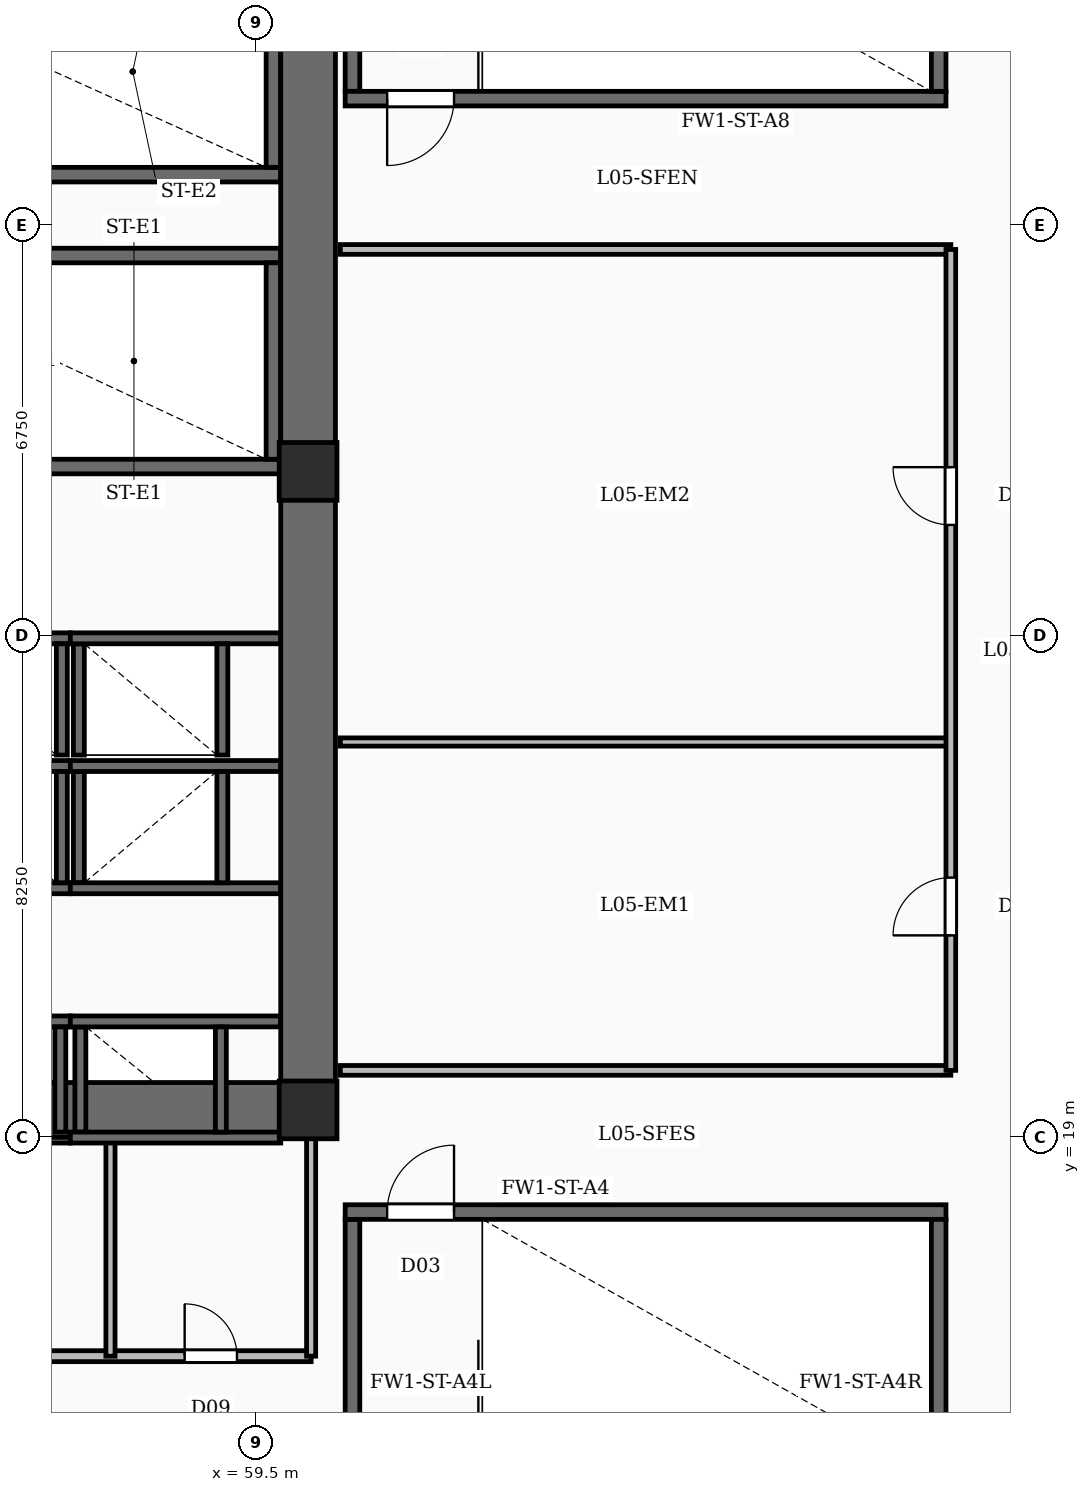
"""IFC4 building model, lengths in metres.
Left out: names, types, materials, properties, quantities, classifications, styles, units other than length and angle.
Written with IfcOpenShell. Run it as: python <this file> out.ifc"""

import sys

from ifc_helpers import new_model, si_unit, direction, frame, frame_2d, origin, origin_2d, place, context, subcontext, project, spatial, rectangle, extrude, element, fill, save


model = new_model("IFC4")
c1 = context("Model", 3, precision=1e-05, world=origin(), true_north=direction((0.0, 1.0)))
c2 = subcontext(c1, "Body", "Model", "MODEL_VIEW")
j1 = project(units=[si_unit("LENGTHUNIT", "METRE"), si_unit("PLANEANGLEUNIT", "RADIAN")], contexts=[c1])
p1 = place(None, origin())
s1 = spatial("IfcSite", under=j1, at=p1, CompositionType="ELEMENT")
p2 = place(p1, origin())
s2 = spatial("IfcBuilding", under=s1, at=p2, CompositionType="ELEMENT")
p3 = place(p2, frame((0.0, 0.0, 28.0)))
s3 = spatial("IfcBuildingStorey", under=s2, at=p3, CompositionType="ELEMENT", Elevation=28.0)
p4 = place(p3, frame((60.35, 19.0, -0.35), z_axis=(0.0, 0.0, 1.0), x_axis=(0.0, 1.0, 0.0)))
e1 = element("IfcWall", 1, at=p4, inside=s3, PredefinedType="SHEAR", context=c2, shape_type="SweptSolid", body=[
    extrude(rectangle(XDim=20.8, YDim=0.9, at=frame_2d((10.4, 0.0))), origin(), (0.0, 0.0, 1.0), 5.9),
])
p5 = place(p3, frame((51.0, 19.45, -0.35), z_axis=(0.0, 0.0, 1.0), x_axis=(1.0, 0.0, 0.0)))
e2 = element("IfcWall", 2, at=p5, inside=s3, PredefinedType="SHEAR", context=c2, shape_type="SweptSolid", body=[
    extrude(rectangle(XDim=8.9, YDim=0.9, at=frame_2d((4.45, 0.0))), origin(), (0.0, 0.0, 1.0), 5.9),
])
for number, where, z_axis, x_axis in (
    (3, (60.35, 19.45, -0.35), (0.0, 0.0, 1.0), (1.0, 0.0, 0.0)),
    (4, (60.35, 29.95, -0.35), (0.0, 0.0, 1.0), (1.0, 0.0, 0.0)),
):
    element("IfcColumn", number, at=place(p3, frame(where, z_axis=z_axis, x_axis=x_axis)), inside=s3, PredefinedType="COLUMN", context=c2, shape_type="SweptSolid", body=[
        extrude(rectangle(XDim=0.95, YDim=0.95, at=origin_2d()), origin(), (0.0, 0.0, 1.0), 5.9),
    ])
p6 = place(p3, frame((60.96, 17.77, 0.0), z_axis=(0.0, 0.0, 1.0), x_axis=(1.0, 0.0, 0.0)))
e5 = element("IfcWall", 5, at=p6, inside=s3, PredefinedType="SOLIDWALL", context=c2, shape_type="SweptSolid", body=[
    extrude(rectangle(XDim=9.88, YDim=0.24, at=frame_2d((4.94, 0.0))), origin(), (0.0, 0.0, 1.0), 5.55),
])
p7 = place(p6, frame((0.69, 0.0, 0.0)))
e6 = element("IfcOpeningElement", 6, at=p7, cuts=e5, PredefinedType="OPENING", context=c2, shape_type="SweptSolid", body=[
    extrude(rectangle(XDim=1.1, YDim=2.15, at=frame_2d((0.55, 1.075))), frame((0.0, 0.13, 0.0), z_axis=(0.0, -1.0, 0.0), x_axis=(1.0, 0.0, 0.0)), (0.0, 0.0, 1.0), 0.26),
])
for number, where, z_axis, x_axis in (
    (7, (61.08, 13.5, 0.0), (0.0, 0.0, 1.0), (0.0, 1.0, 0.0)),
    (8, (70.72, 13.5, 0.0), (0.0, 0.0, 1.0), (0.0, 1.0, 0.0)),
):
    element("IfcWall", number, at=place(p3, frame(where, z_axis=z_axis, x_axis=x_axis)), inside=s3, PredefinedType="SOLIDWALL", context=c2, shape_type="SweptSolid", body=[
        extrude(rectangle(XDim=4.15, YDim=0.24, at=frame_2d((2.075, 0.0))), origin(), (0.0, 0.0, 1.0), 5.55),
    ])
p8 = place(p3, frame((70.84, 36.08, 0.0), z_axis=(0.0, 0.0, 1.0), x_axis=(-1.0, 0.0, 0.0)))
e9 = element("IfcWall", 9, at=p8, inside=s3, PredefinedType="SOLIDWALL", context=c2, shape_type="SweptSolid", body=[
    extrude(rectangle(XDim=9.88, YDim=0.24, at=frame_2d((4.94, 0.0))), origin(), (0.0, 0.0, 1.0), 5.55),
])
p9 = place(p8, frame((8.09, 0.0, 0.0)))
e10 = element("IfcOpeningElement", 10, at=p9, cuts=e9, PredefinedType="OPENING", context=c2, shape_type="SweptSolid", body=[
    extrude(rectangle(XDim=1.1, YDim=2.15, at=frame_2d((0.55, 1.075))), frame((0.0, 0.13, 0.0), z_axis=(0.0, -1.0, 0.0), x_axis=(1.0, 0.0, 0.0)), (0.0, 0.0, 1.0), 0.26),
])
for number, where, z_axis, x_axis in (
    (11, (61.08, 36.2, 0.0), (0.0, 0.0, 1.0), (0.0, 1.0, 0.0)),
    (12, (70.72, 36.2, 0.0), (0.0, 0.0, 1.0), (0.0, 1.0, 0.0)),
):
    element("IfcWall", number, at=place(p3, frame(where, z_axis=z_axis, x_axis=x_axis)), inside=s3, PredefinedType="SOLIDWALL", context=c2, shape_type="SweptSolid", body=[
        extrude(rectangle(XDim=4.15, YDim=0.24, at=frame_2d((2.075, 0.0))), origin(), (0.0, 0.0, 1.0), 5.55),
    ])
p10 = place(p3, frame((59.9, 30.03, 0.0), z_axis=(0.0, 0.0, 1.0), x_axis=(-1.0, 0.0, 0.0)))
e13 = element("IfcWall", 13, at=p10, inside=s3, PredefinedType="SOLIDWALL", context=c2, shape_type="SweptSolid", body=[
    extrude(rectangle(XDim=8.9, YDim=0.24, at=frame_2d((4.45, 0.0))), origin(), (0.0, 0.0, 1.0), 5.55),
])
p11 = place(p10, frame((7.38, 0.0, 0.0)))
e14 = element("IfcOpeningElement", 14, at=p11, cuts=e13, PredefinedType="OPENING", context=c2, shape_type="SweptSolid", body=[
    extrude(rectangle(XDim=1.1, YDim=2.15, at=frame_2d((0.55, 1.075))), frame((0.0, 0.13, 0.0), z_axis=(0.0, -1.0, 0.0), x_axis=(1.0, 0.0, 0.0)), (0.0, 0.0, 1.0), 0.26),
])
p12 = place(p3, frame((51.0, 33.5, 0.0), z_axis=(0.0, 0.0, 1.0), x_axis=(1.0, 0.0, 0.0)))
e15 = element("IfcWall", 15, at=p12, inside=s3, PredefinedType="SOLIDWALL", context=c2, shape_type="SweptSolid", body=[
    extrude(rectangle(XDim=8.9, YDim=0.24, at=frame_2d((4.45, 0.0))), origin(), (0.0, 0.0, 1.0), 5.55),
])
p13 = place(p3, frame((59.78, 30.15, 0.0), z_axis=(0.0, 0.0, 1.0), x_axis=(0.0, 1.0, 0.0)))
e16 = element("IfcWall", 16, at=p13, inside=s3, PredefinedType="SOLIDWALL", context=c2, shape_type="SweptSolid", body=[
    extrude(rectangle(XDim=3.23, YDim=0.24, at=frame_2d((1.615, 0.0))), origin(), (0.0, 0.0, 1.0), 5.55),
])
p14 = place(p3, frame((59.9, 34.83, 0.0), z_axis=(0.0, 0.0, 1.0), x_axis=(-1.0, 0.0, 0.0)))
e17 = element("IfcWall", 17, at=p14, inside=s3, PredefinedType="SOLIDWALL", context=c2, shape_type="SweptSolid", body=[
    extrude(rectangle(XDim=8.9, YDim=0.24, at=frame_2d((4.45, 0.0))), origin(), (0.0, 0.0, 1.0), 5.55),
])
p15 = place(p14, frame((7.42, 0.0, 0.0)))
e18 = element("IfcOpeningElement", 18, at=p15, cuts=e17, PredefinedType="OPENING", context=c2, shape_type="SweptSolid", body=[
    extrude(rectangle(XDim=1.1, YDim=2.15, at=frame_2d((0.55, 1.075))), frame((0.0, 0.13, 0.0), z_axis=(0.0, -1.0, 0.0), x_axis=(1.0, 0.0, 0.0)), (0.0, 0.0, 1.0), 0.26),
])
p16 = place(p3, frame((59.78, 34.95, 0.0), z_axis=(0.0, 0.0, 1.0), x_axis=(0.0, 1.0, 0.0)))
e19 = element("IfcWall", 19, at=p16, inside=s3, PredefinedType="SOLIDWALL", context=c2, shape_type="SweptSolid", body=[
    extrude(rectangle(XDim=3.15, YDim=0.24, at=frame_2d((1.575, 0.0))), origin(), (0.0, 0.0, 1.0), 5.55),
])
for number, where, z_axis, x_axis in (
    (20, (53.79, 20.905, 0.0), (0.0, 0.0, 1.0), (1.0, 0.0, 0.0)),
    (21, (53.79, 18.995, 0.0), (0.0, 0.0, 1.0), (1.0, 0.0, 0.0)),
):
    element("IfcWall", number, at=place(p3, frame(where, z_axis=z_axis, x_axis=x_axis)), inside=s3, PredefinedType="SOLIDWALL", context=c2, shape_type="SweptSolid", body=[
        extrude(rectangle(XDim=2.65, YDim=0.18, at=frame_2d((1.325, 0.0))), origin(), (0.0, 0.0, 1.0), 5.55),
    ])
p17 = place(p3, frame((56.275, 19.085, 0.0), z_axis=(0.0, 0.0, 1.0), x_axis=(0.0, 1.0, 0.0)))
e22 = element("IfcWall", 22, at=p17, inside=s3, PredefinedType="SOLIDWALL", context=c2, shape_type="SweptSolid", body=[
    extrude(rectangle(XDim=1.73, YDim=0.18, at=frame_2d((0.865, 0.0))), origin(), (0.0, 0.0, 1.0), 5.55),
])
for number, where, z_axis, x_axis in (
    (23, (56.44, 20.905, 0.0), (0.0, 0.0, 1.0), (1.0, 0.0, 0.0)),
    (24, (56.44, 18.995, 0.0), (0.0, 0.0, 1.0), (1.0, 0.0, 0.0)),
):
    element("IfcWall", number, at=place(p3, frame(where, z_axis=z_axis, x_axis=x_axis)), inside=s3, PredefinedType="SOLIDWALL", context=c2, shape_type="SweptSolid", body=[
        extrude(rectangle(XDim=3.46, YDim=0.18, at=frame_2d((1.73, 0.0))), origin(), (0.0, 0.0, 1.0), 5.55),
    ])
for number, where, z_axis, x_axis in (
    (25, (56.605, 19.085, 0.0), (0.0, 0.0, 1.0), (0.0, 1.0, 0.0)),
    (26, (58.915, 19.085, 0.0), (0.0, 0.0, 1.0), (0.0, 1.0, 0.0)),
):
    element("IfcWall", number, at=place(p3, frame(where, z_axis=z_axis, x_axis=x_axis)), inside=s3, PredefinedType="SOLIDWALL", context=c2, shape_type="SweptSolid", body=[
        extrude(rectangle(XDim=1.73, YDim=0.18, at=frame_2d((0.865, 0.0))), origin(), (0.0, 0.0, 1.0), 5.55),
    ])
for number, where, z_axis, x_axis in (
    (27, (53.778, 25.105, 0.0), (0.0, 0.0, 1.0), (1.0, 0.0, 0.0)),
    (28, (53.778, 23.095, 0.0), (0.0, 0.0, 1.0), (1.0, 0.0, 0.0)),
):
    element("IfcWall", number, at=place(p3, frame(where, z_axis=z_axis, x_axis=x_axis)), inside=s3, PredefinedType="SOLIDWALL", context=c2, shape_type="SweptSolid", body=[
        extrude(rectangle(XDim=2.662, YDim=0.18, at=frame_2d((1.331, 0.0))), origin(), (0.0, 0.0, 1.0), 5.55),
    ])
p18 = place(p3, frame((56.3, 23.185, 0.0), z_axis=(0.0, 0.0, 1.0), x_axis=(0.0, 1.0, 0.0)))
e29 = element("IfcWall", 29, at=p18, inside=s3, PredefinedType="SOLIDWALL", context=c2, shape_type="SweptSolid", body=[
    extrude(rectangle(XDim=1.83, YDim=0.18, at=frame_2d((0.915, 0.0))), origin(), (0.0, 0.0, 1.0), 5.55),
])
for number, where, z_axis, x_axis in (
    (30, (56.44, 25.105, 0.0), (0.0, 0.0, 1.0), (1.0, 0.0, 0.0)),
    (31, (56.44, 23.095, 0.0), (0.0, 0.0, 1.0), (1.0, 0.0, 0.0)),
):
    element("IfcWall", number, at=place(p3, frame(where, z_axis=z_axis, x_axis=x_axis)), inside=s3, PredefinedType="SOLIDWALL", context=c2, shape_type="SweptSolid", body=[
        extrude(rectangle(XDim=3.46, YDim=0.18, at=frame_2d((1.73, 0.0))), origin(), (0.0, 0.0, 1.0), 5.55),
    ])
for number, where, z_axis, x_axis in (
    (32, (56.58, 23.185, 0.0), (0.0, 0.0, 1.0), (0.0, 1.0, 0.0)),
    (33, (58.94, 23.185, 0.0), (0.0, 0.0, 1.0), (0.0, 1.0, 0.0)),
):
    element("IfcWall", number, at=place(p3, frame(where, z_axis=z_axis, x_axis=x_axis)), inside=s3, PredefinedType="SOLIDWALL", context=c2, shape_type="SweptSolid", body=[
        extrude(rectangle(XDim=1.83, YDim=0.18, at=frame_2d((0.915, 0.0))), origin(), (0.0, 0.0, 1.0), 5.55),
    ])
p19 = place(p3, frame((53.865, 27.205, 0.0), z_axis=(0.0, 0.0, 1.0), x_axis=(1.0, 0.0, 0.0)))
e34 = element("IfcWall", 34, at=p19, inside=s3, PredefinedType="SOLIDWALL", context=c2, shape_type="SweptSolid", body=[
    extrude(rectangle(XDim=2.575, YDim=0.18, at=frame_2d((1.288, 0.0))), origin(), (0.0, 0.0, 1.0), 5.55),
])
p20 = place(p3, frame((56.3, 25.285, 0.0), z_axis=(0.0, 0.0, 1.0), x_axis=(0.0, 1.0, 0.0)))
e35 = element("IfcWall", 35, at=p20, inside=s3, PredefinedType="SOLIDWALL", context=c2, shape_type="SweptSolid", body=[
    extrude(rectangle(XDim=1.83, YDim=0.18, at=frame_2d((0.915, 0.0))), origin(), (0.0, 0.0, 1.0), 5.55),
])
p21 = place(p3, frame((56.44, 27.205, 0.0), z_axis=(0.0, 0.0, 1.0), x_axis=(1.0, 0.0, 0.0)))
e36 = element("IfcWall", 36, at=p21, inside=s3, PredefinedType="SOLIDWALL", context=c2, shape_type="SweptSolid", body=[
    extrude(rectangle(XDim=3.46, YDim=0.18, at=frame_2d((1.73, 0.0))), origin(), (0.0, 0.0, 1.0), 5.55),
])
for number, where, z_axis, x_axis in (
    (37, (56.58, 25.285, 0.0), (0.0, 0.0, 1.0), (0.0, 1.0, 0.0)),
    (38, (58.94, 25.285, 0.0), (0.0, 0.0, 1.0), (0.0, 1.0, 0.0)),
):
    element("IfcWall", number, at=place(p3, frame(where, z_axis=z_axis, x_axis=x_axis)), inside=s3, PredefinedType="SOLIDWALL", context=c2, shape_type="SweptSolid", body=[
        extrude(rectangle(XDim=1.83, YDim=0.18, at=frame_2d((0.915, 0.0))), origin(), (0.0, 0.0, 1.0), 5.55),
    ])
p22 = place(p3, frame((57.1, 15.4, 0.0), z_axis=(0.0, 0.0, 1.0), x_axis=(0.0, 1.0, 0.0)))
e39 = element("IfcWall", 39, at=p22, inside=s3, PredefinedType="PARTITIONING", context=c2, shape_type="SweptSolid", body=[
    extrude(rectangle(XDim=3.58, YDim=0.15, at=frame_2d((1.79, 0.0))), origin(), (0.0, 0.0, 1.0), 4.61),
])
p23 = place(p3, frame((50.4, 15.4, 0.0), z_axis=(0.0, 0.0, 1.0), x_axis=(1.0, 0.0, 0.0)))
e40 = element("IfcWall", 40, at=p23, inside=s3, PredefinedType="SOLIDWALL", context=c2, shape_type="SweptSolid", body=[
    extrude(rectangle(XDim=10.0, YDim=0.18, at=frame_2d((5.0, 0.0))), origin(), (0.0, 0.0, 1.0), 4.61),
])
p24 = place(p23, frame((1.19, 0.0, 0.0)))
e41 = element("IfcOpeningElement", 41, at=p24, cuts=e40, PredefinedType="OPENING", context=c2, shape_type="SweptSolid", body=[
    extrude(rectangle(XDim=0.92, YDim=2.1, at=frame_2d((0.46, 1.05))), frame((0.0, 0.1, 0.0), z_axis=(0.0, -1.0, 0.0), x_axis=(1.0, 0.0, 0.0)), (0.0, 0.0, 1.0), 0.2),
])
p25 = place(p23, frame((4.54, 0.0, 0.0)))
e42 = element("IfcOpeningElement", 42, at=p25, cuts=e40, PredefinedType="OPENING", context=c2, shape_type="SweptSolid", body=[
    extrude(rectangle(XDim=0.92, YDim=2.1, at=frame_2d((0.46, 1.05))), frame((0.0, 0.1, 0.0), z_axis=(0.0, -1.0, 0.0), x_axis=(1.0, 0.0, 0.0)), (0.0, 0.0, 1.0), 0.2),
])
p26 = place(p23, frame((7.92, 0.0, 0.0)))
e43 = element("IfcOpeningElement", 43, at=p26, cuts=e40, PredefinedType="OPENING", context=c2, shape_type="SweptSolid", body=[
    extrude(rectangle(XDim=0.86, YDim=2.05, at=frame_2d((0.43, 1.025))), frame((0.0, 0.1, 0.0), z_axis=(0.0, -1.0, 0.0), x_axis=(1.0, 0.0, 0.0)), (0.0, 0.0, 1.0), 0.2),
])
p27 = place(p3, frame((60.4, 15.4, 0.0), z_axis=(0.0, 0.0, 1.0), x_axis=(0.0, 1.0, 0.0)))
e44 = element("IfcWall", 44, at=p27, inside=s3, PredefinedType="PARTITIONING", context=c2, shape_type="SweptSolid", body=[
    extrude(rectangle(XDim=3.58, YDim=0.15, at=frame_2d((1.79, 0.0))), origin(), (0.0, 0.0, 1.0), 4.61),
])
p28 = place(p3, frame((60.88, 25.5, 0.0), z_axis=(0.0, 0.0, 1.0), x_axis=(1.0, 0.0, 0.0)))
e45 = element("IfcWall", 45, at=p28, inside=s3, PredefinedType="PARTITIONING", context=c2, shape_type="SweptSolid", body=[
    extrude(rectangle(XDim=10.04, YDim=0.135, at=frame_2d((5.02, 0.0))), origin(), (0.0, 0.0, 1.0), 4.61),
])
p29 = place(p3, frame((70.92, 20.1, 0.0), z_axis=(0.0, 0.0, 1.0), x_axis=(0.0, 1.0, 0.0)))
e46 = element("IfcWall", 46, at=p29, inside=s3, PredefinedType="PARTITIONING", context=c2, shape_type="SweptSolid", body=[
    extrude(rectangle(XDim=13.5, YDim=0.16, at=frame_2d((6.75, 0.0))), origin(), (0.0, 0.0, 1.0), 4.61),
])
p30 = place(p29, frame((2.22, 0.0, 0.0)))
e47 = element("IfcOpeningElement", 47, at=p30, cuts=e46, PredefinedType="OPENING", context=c2, shape_type="SweptSolid", body=[
    extrude(rectangle(XDim=0.95, YDim=2.15, at=frame_2d((0.475, 1.075))), frame((0.0, 0.09, 0.0), z_axis=(0.0, -1.0, 0.0), x_axis=(1.0, 0.0, 0.0)), (0.0, 0.0, 1.0), 0.18),
])
p31 = place(p29, frame((8.97, 0.0, 0.0)))
e48 = element("IfcOpeningElement", 48, at=p31, cuts=e46, PredefinedType="OPENING", context=c2, shape_type="SweptSolid", body=[
    extrude(rectangle(XDim=0.95, YDim=2.15, at=frame_2d((0.475, 1.075))), frame((0.0, 0.09, 0.0), z_axis=(0.0, -1.0, 0.0), x_axis=(1.0, 0.0, 0.0)), (0.0, 0.0, 1.0), 0.18),
])
p32 = place(p3, frame((60.88, 20.1, 0.0), z_axis=(0.0, 0.0, 1.0), x_axis=(1.0, 0.0, 0.0)))
e49 = element("IfcWall", 49, at=p32, inside=s3, PredefinedType="PARTITIONING", context=c2, shape_type="SweptSolid", body=[
    extrude(rectangle(XDim=10.04, YDim=0.16, at=frame_2d((5.02, 0.0))), origin(), (0.0, 0.0, 1.0), 3.6),
])
p33 = place(p3, frame((60.88, 33.6, 0.0), z_axis=(0.0, 0.0, 1.0), x_axis=(1.0, 0.0, 0.0)))
e50 = element("IfcWall", 50, at=p33, inside=s3, PredefinedType="PARTITIONING", context=c2, shape_type="SweptSolid", body=[
    extrude(rectangle(XDim=10.04, YDim=0.16, at=frame_2d((5.02, 0.0))), origin(), (0.0, 0.0, 1.0), 4.61),
])
p34 = place(p7, origin())
e51 = element("IfcDoor", 51, at=p34, inside=s3, OperationType="SINGLE_SWING_RIGHT", PredefinedType="DOOR", context=c2, shape_type="SweptSolid", body=[
    extrude(rectangle(XDim=1.1, YDim=2.15, at=frame_2d((0.55, 1.075))), frame((0.0, 0.025, 0.0), z_axis=(0.0, -1.0, 0.0), x_axis=(1.0, 0.0, 0.0)), (0.0, 0.0, 1.0), 0.05),
])
fill(e6, e51)
p35 = place(p9, origin())
e52 = element("IfcDoor", 52, at=p35, inside=s3, OperationType="SINGLE_SWING_RIGHT", PredefinedType="DOOR", context=c2, shape_type="SweptSolid", body=[
    extrude(rectangle(XDim=1.1, YDim=2.15, at=frame_2d((0.55, 1.075))), frame((0.0, 0.025, 0.0), z_axis=(0.0, -1.0, 0.0), x_axis=(1.0, 0.0, 0.0)), (0.0, 0.0, 1.0), 0.05),
])
fill(e10, e52)
p36 = place(p26, origin())
e53 = element("IfcDoor", 53, at=p36, inside=s3, OperationType="SINGLE_SWING_LEFT", PredefinedType="DOOR", context=c2, shape_type="SweptSolid", body=[
    extrude(rectangle(XDim=0.86, YDim=2.05, at=frame_2d((0.43, 1.025))), frame((0.0, 0.025, 0.0), z_axis=(0.0, -1.0, 0.0), x_axis=(1.0, 0.0, 0.0)), (0.0, 0.0, 1.0), 0.05),
])
fill(e43, e53)
p37 = place(p30, origin())
e54 = element("IfcDoor", 54, at=p37, inside=s3, OperationType="SINGLE_SWING_LEFT", PredefinedType="DOOR", context=c2, shape_type="SweptSolid", body=[
    extrude(rectangle(XDim=0.95, YDim=2.15, at=frame_2d((0.475, 1.075))), frame((0.0, 0.025, 0.0), z_axis=(0.0, -1.0, 0.0), x_axis=(1.0, 0.0, 0.0)), (0.0, 0.0, 1.0), 0.05),
])
fill(e47, e54)
p38 = place(p31, origin())
e55 = element("IfcDoor", 55, at=p38, inside=s3, OperationType="SINGLE_SWING_RIGHT", PredefinedType="DOOR", context=c2, shape_type="SweptSolid", body=[
    extrude(rectangle(XDim=0.95, YDim=2.15, at=frame_2d((0.475, 1.075))), frame((0.0, 0.025, 0.0), z_axis=(0.0, -1.0, 0.0), x_axis=(1.0, 0.0, 0.0)), (0.0, 0.0, 1.0), 0.05),
])
fill(e48, e55)
save(model, sys.argv[1])
